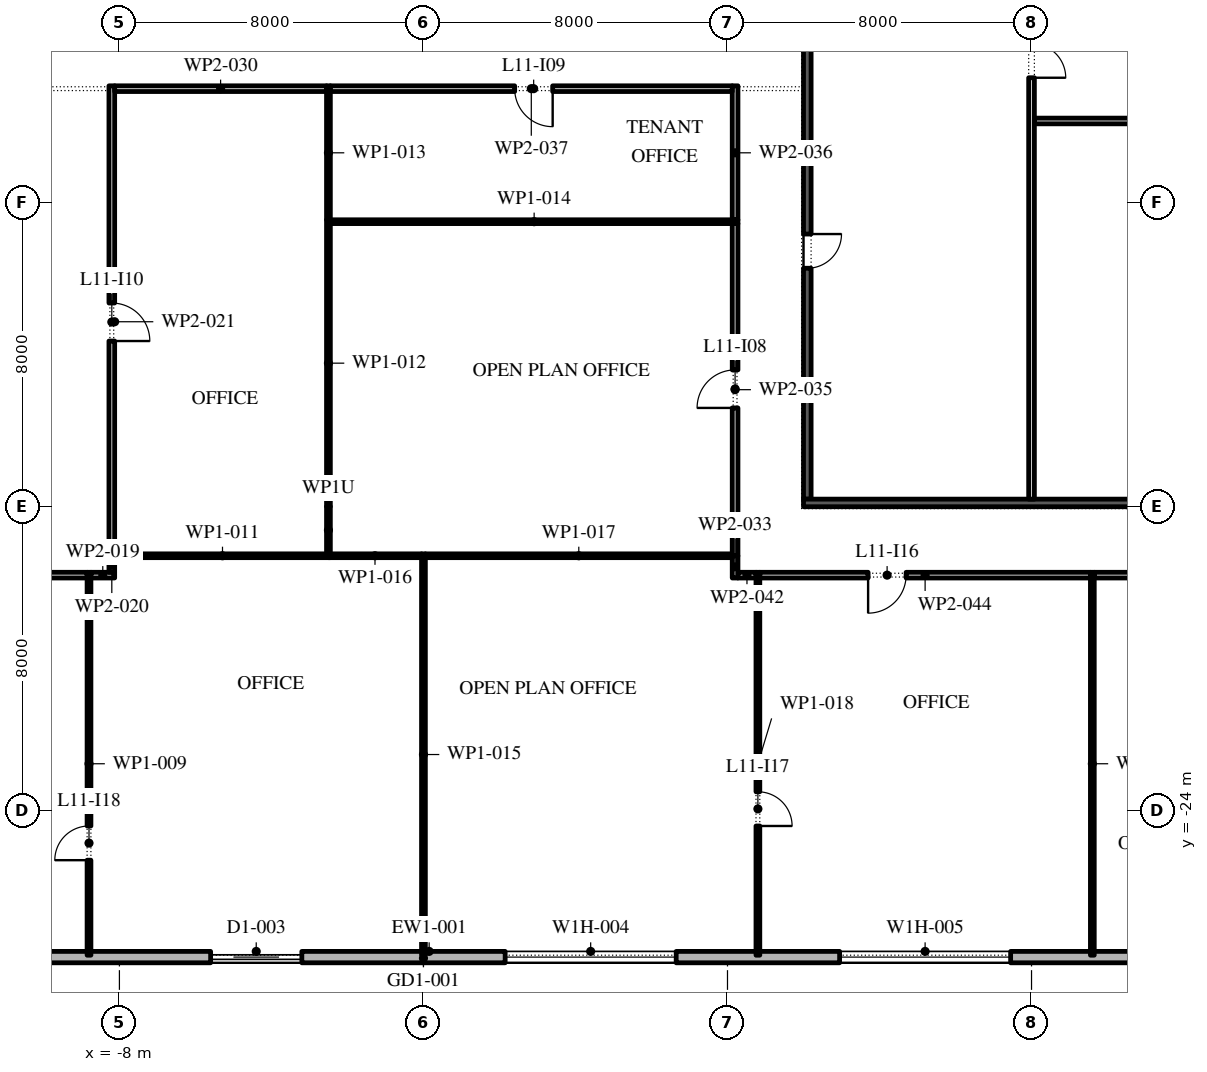
"""IFC4 building model, lengths in metres.
Left out: names, types, materials, properties, quantities, classifications, styles, units other than length and angle.
Written with IfcOpenShell. Run it as: python <this file> out.ifc"""

import sys

from ifc_helpers import new_model, si_unit, direction, frame, frame_2d, origin, place, context, subcontext, project, spatial, rectangle, extrude, element, fill, save


model = new_model("IFC4")
c1 = context("Model", 3, precision=1e-05, world=origin(), true_north=direction((0.0, 1.0)))
c2 = subcontext(c1, "Body", "Model", "MODEL_VIEW")
j1 = project(units=[si_unit("LENGTHUNIT", "METRE"), si_unit("PLANEANGLEUNIT", "RADIAN")], contexts=[c1])
p1 = place(None, origin())
s1 = spatial("IfcSite", under=j1, at=p1, CompositionType="ELEMENT")
p2 = place(p1, origin())
s2 = spatial("IfcBuilding", under=s1, at=p2, CompositionType="ELEMENT")
p3 = place(p2, frame((0.0, 0.0, 56.4)))
s3 = spatial("IfcBuildingStorey", under=s2, at=p3, CompositionType="ELEMENT", Elevation=56.4)
p4 = place(p3, frame((-26.1, -27.85, 0.0), z_axis=(0.0, 0.0, 1.0), x_axis=(1.0, 0.0, 0.0)))
e1 = element("IfcWall", 1, at=p4, inside=s3, PredefinedType="STANDARD", context=c2, shape_type="SweptSolid", body=[
    extrude(rectangle(XDim=52.5, YDim=0.3, at=frame_2d((26.25, 0.0))), origin(), (0.0, 0.0, 1.0), 4.0),
])
p5 = place(p4, frame((2.0, 0.0, 0.45)))
e2 = element("IfcOpeningElement", 2, at=p5, cuts=e1, PredefinedType="OPENING", context=c2, shape_type="SweptSolid", body=[
    extrude(rectangle(XDim=4.5, YDim=2.75, at=frame_2d((2.25, 1.375))), frame((0.0, 0.16, 0.0), z_axis=(0.0, -1.0, 0.0), x_axis=(1.0, 0.0, 0.0)), (0.0, 0.0, 1.0), 0.32),
])
p6 = place(p4, frame((10.65, 0.0, 0.45)))
e3 = element("IfcOpeningElement", 3, at=p6, cuts=e1, PredefinedType="OPENING", context=c2, shape_type="SweptSolid", body=[
    extrude(rectangle(XDim=4.5, YDim=2.75, at=frame_2d((2.25, 1.375))), frame((0.0, 0.16, 0.0), z_axis=(0.0, -1.0, 0.0), x_axis=(1.0, 0.0, 0.0)), (0.0, 0.0, 1.0), 0.32),
])
p7 = place(p4, frame((20.5, 0.0, 0.0)))
e4 = element("IfcOpeningElement", 4, at=p7, cuts=e1, PredefinedType="OPENING", context=c2, shape_type="SweptSolid", body=[
    extrude(rectangle(XDim=2.4, YDim=3.5, at=frame_2d((1.2, 1.75))), frame((0.0, 0.16, 0.0), z_axis=(0.0, -1.0, 0.0), x_axis=(1.0, 0.0, 0.0)), (0.0, 0.0, 1.0), 0.32),
])
p8 = place(p4, frame((28.25, 0.0, 0.45)))
e5 = element("IfcOpeningElement", 5, at=p8, cuts=e1, PredefinedType="OPENING", context=c2, shape_type="SweptSolid", body=[
    extrude(rectangle(XDim=4.5, YDim=2.75, at=frame_2d((2.25, 1.375))), frame((0.0, 0.16, 0.0), z_axis=(0.0, -1.0, 0.0), x_axis=(1.0, 0.0, 0.0)), (0.0, 0.0, 1.0), 0.32),
])
p9 = place(p4, frame((37.05, 0.0, 0.45)))
e6 = element("IfcOpeningElement", 6, at=p9, cuts=e1, PredefinedType="OPENING", context=c2, shape_type="SweptSolid", body=[
    extrude(rectangle(XDim=4.5, YDim=2.75, at=frame_2d((2.25, 1.375))), frame((0.0, 0.16, 0.0), z_axis=(0.0, -1.0, 0.0), x_axis=(1.0, 0.0, 0.0)), (0.0, 0.0, 1.0), 0.32),
])
p10 = place(p4, frame((45.85, 0.0, 0.45)))
e7 = element("IfcOpeningElement", 7, at=p10, cuts=e1, PredefinedType="OPENING", context=c2, shape_type="SweptSolid", body=[
    extrude(rectangle(XDim=4.5, YDim=2.75, at=frame_2d((2.25, 1.375))), frame((0.0, 0.16, 0.0), z_axis=(0.0, -1.0, 0.0), x_axis=(1.0, 0.0, 0.0)), (0.0, 0.0, 1.0), 0.32),
])
p11 = place(p3, frame((10.1, -15.8, 0.0), z_axis=(0.0, 0.0, 1.0), x_axis=(0.0, 1.0, 0.0)))
e8 = element("IfcWall", 8, at=p11, inside=s3, PredefinedType="SHEAR", context=c2, shape_type="SweptSolid", body=[
    extrude(rectangle(XDim=13.05, YDim=0.2, at=frame_2d((6.525, 0.0))), origin(), (0.0, 0.0, 1.0), 4.0),
])
p12 = place(p11, frame((6.075, 0.0, 0.0)))
e9 = element("IfcOpeningElement", 9, at=p12, cuts=e8, PredefinedType="OPENING", context=c2, shape_type="SweptSolid", body=[
    extrude(rectangle(XDim=0.9, YDim=2.1, at=frame_2d((0.45, 1.05))), frame((0.0, 0.11, 0.0), z_axis=(0.0, -1.0, 0.0), x_axis=(1.0, 0.0, 0.0)), (0.0, 0.0, 1.0), 0.22),
])
p13 = place(p3, frame((10.0, -15.9, 0.0), z_axis=(0.0, 0.0, 1.0), x_axis=(1.0, 0.0, 0.0)))
e10 = element("IfcWall", 10, at=p13, inside=s3, PredefinedType="SHEAR", context=c2, shape_type="SweptSolid", body=[
    extrude(rectangle(XDim=12.0, YDim=0.2, at=frame_2d((6.0, 0.0))), origin(), (0.0, 0.0, 1.0), 4.0),
])
p14 = place(p3, frame((16.0, -15.8, 0.0), z_axis=(0.0, 0.0, 1.0), x_axis=(0.0, 1.0, 0.0)))
e11 = element("IfcWall", 11, at=p14, inside=s3, PredefinedType="PARTITIONING", context=c2, shape_type="SweptSolid", body=[
    extrude(rectangle(XDim=13.05, YDim=0.15, at=frame_2d((6.525, 0.0))), origin(), (0.0, 0.0, 1.0), 4.0),
])
p15 = place(p14, frame((11.087, 0.0, 0.0)))
e12 = element("IfcOpeningElement", 12, at=p15, cuts=e11, PredefinedType="OPENING", context=c2, shape_type="SweptSolid", body=[
    extrude(rectangle(XDim=0.9, YDim=2.1, at=frame_2d((0.45, 1.05))), frame((0.0, 0.085, 0.0), z_axis=(0.0, -1.0, 0.0), x_axis=(1.0, 0.0, 0.0)), (0.0, 0.0, 1.0), 0.17),
])
p16 = place(p3, frame((16.075, -5.85, 0.0), z_axis=(0.0, 0.0, 1.0), x_axis=(1.0, 0.0, 0.0)))
e13 = element("IfcWall", 13, at=p16, inside=s3, PredefinedType="PARTITIONING", context=c2, shape_type="SweptSolid", body=[
    extrude(rectangle(XDim=5.725, YDim=0.15, at=frame_2d((2.863, 0.0))), origin(), (0.0, 0.0, 1.0), 4.0),
])
p17 = place(p3, frame((-8.8, -27.8, 0.0), z_axis=(0.0, 0.0, 1.0), x_axis=(0.0, 1.0, 0.0)))
e14 = element("IfcWall", 14, at=p17, inside=s3, PredefinedType="PARTITIONING", context=c2, shape_type="SweptSolid", body=[
    extrude(rectangle(XDim=10.075, YDim=0.1, at=frame_2d((5.038, 0.0))), origin(), (0.0, 0.0, 1.0), 4.0),
])
p18 = place(p17, frame((2.5, 0.0, 0.0)))
e15 = element("IfcOpeningElement", 15, at=p18, cuts=e14, PredefinedType="OPENING", context=c2, shape_type="SweptSolid", body=[
    extrude(rectangle(XDim=0.9, YDim=2.1, at=frame_2d((0.45, 1.05))), frame((0.0, 0.06, 0.0), z_axis=(0.0, -1.0, 0.0), x_axis=(1.0, 0.0, 0.0)), (0.0, 0.0, 1.0), 0.12),
])
p19 = place(p3, frame((-8.85, -17.8, 0.0), z_axis=(0.0, 0.0, 1.0), x_axis=(-1.0, 0.0, 0.0)))
e16 = element("IfcWall", 16, at=p19, inside=s3, PredefinedType="PARTITIONING", context=c2, shape_type="SweptSolid", body=[
    extrude(rectangle(XDim=8.7, YDim=0.15, at=frame_2d((4.35, 0.0))), origin(), (0.0, 0.0, 1.0), 4.0),
])
p20 = place(p19, frame((5.6, 0.0, 0.0)))
e17 = element("IfcOpeningElement", 17, at=p20, cuts=e16, PredefinedType="OPENING", context=c2, shape_type="SweptSolid", body=[
    extrude(rectangle(XDim=1.0, YDim=2.1, at=frame_2d((0.5, 1.05))), frame((0.0, 0.085, 0.0), z_axis=(0.0, -1.0, 0.0), x_axis=(1.0, 0.0, 0.0)), (0.0, 0.0, 1.0), 0.17),
])
p21 = place(p3, frame((-8.125, -17.8, 0.0), z_axis=(0.0, 0.0, 1.0), x_axis=(-1.0, 0.0, 0.0)))
e18 = element("IfcWall", 18, at=p21, inside=s3, PredefinedType="PARTITIONING", context=c2, shape_type="SweptSolid", body=[
    extrude(rectangle(XDim=0.625, YDim=0.15, at=frame_2d((0.312, 0.0))), origin(), (0.0, 0.0, 1.0), 4.0),
])
p22 = place(p3, frame((-8.2, -17.34, 0.0), z_axis=(0.0, 0.0, 1.0), x_axis=(0.0, -1.0, 0.0)))
e19 = element("IfcWall", 19, at=p22, inside=s3, PredefinedType="PARTITIONING", context=c2, shape_type="SweptSolid", body=[
    extrude(rectangle(XDim=0.385, YDim=0.15, at=frame_2d((0.192, 0.0))), origin(), (0.0, 0.0, 1.0), 4.0),
])
p23 = place(p3, frame((-8.2, -4.925, 0.0), z_axis=(0.0, 0.0, 1.0), x_axis=(0.0, -1.0, 0.0)))
e20 = element("IfcWall", 20, at=p23, inside=s3, PredefinedType="PARTITIONING", context=c2, shape_type="SweptSolid", body=[
    extrude(rectangle(XDim=12.415, YDim=0.15, at=frame_2d((6.208, 0.0))), origin(), (0.0, 0.0, 1.0), 4.0),
])
p24 = place(p23, frame((5.715, 0.0, 0.0)))
e21 = element("IfcOpeningElement", 21, at=p24, cuts=e20, PredefinedType="OPENING", context=c2, shape_type="SweptSolid", body=[
    extrude(rectangle(XDim=1.0, YDim=2.1, at=frame_2d((0.5, 1.05))), frame((0.0, 0.085, 0.0), z_axis=(0.0, -1.0, 0.0), x_axis=(1.0, 0.0, 0.0)), (0.0, 0.0, 1.0), 0.17),
])
p25 = place(p3, frame((-2.45, -17.29, 0.0), z_axis=(0.0, 0.0, 1.0), x_axis=(-1.0, 0.0, 0.0)))
e22 = element("IfcWall", 22, at=p25, inside=s3, PredefinedType="PARTITIONING", context=c2, shape_type="SweptSolid", body=[
    extrude(rectangle(XDim=5.675, YDim=0.1, at=frame_2d((2.837, 0.0))), origin(), (0.0, 0.0, 1.0), 4.0),
])
p26 = place(p3, frame((-2.5, -17.24, 0.0), z_axis=(0.0, 0.0, 1.0), x_axis=(0.0, 1.0, 0.0)))
e23 = element("IfcWall", 23, at=p26, inside=s3, PredefinedType="PARTITIONING", context=c2, shape_type="SweptSolid", body=[
    extrude(rectangle(XDim=1.245, YDim=0.1, at=frame_2d((0.623, 0.0))), origin(), (0.0, 0.0, 1.0), 3.322),
])
p27 = place(p3, frame((-2.5, -8.45, 0.0), z_axis=(0.0, 0.0, 1.0), x_axis=(0.0, 1.0, 0.0)))
e24 = element("IfcWall", 24, at=p27, inside=s3, PredefinedType="PARTITIONING", context=c2, shape_type="SweptSolid", body=[
    extrude(rectangle(XDim=3.525, YDim=0.1, at=frame_2d((1.762, 0.0))), origin(), (0.0, 0.0, 1.0), 4.0),
])
p28 = place(p3, frame((-2.45, -8.5, 0.0), z_axis=(0.0, 0.0, 1.0), x_axis=(1.0, 0.0, 0.0)))
e25 = element("IfcWall", 25, at=p28, inside=s3, PredefinedType="PARTITIONING", context=c2, shape_type="SweptSolid", body=[
    extrude(rectangle(XDim=10.725, YDim=0.1, at=frame_2d((5.362, 0.0))), origin(), (0.0, 0.0, 1.0), 4.0),
])
p29 = place(p3, frame((-2.55, -5.0, 0.0), z_axis=(0.0, 0.0, 1.0), x_axis=(-1.0, 0.0, 0.0)))
e26 = element("IfcWall", 26, at=p29, inside=s3, PredefinedType="PARTITIONING", context=c2, shape_type="SweptSolid", body=[
    extrude(rectangle(XDim=5.575, YDim=0.15, at=frame_2d((2.788, 0.0))), origin(), (0.0, 0.0, 1.0), 4.0),
])
p30 = place(p3, frame((0.0, -27.8, 0.0), z_axis=(0.0, 0.0, 1.0), x_axis=(0.0, 1.0, 0.0)))
e27 = element("IfcWall", 27, at=p30, inside=s3, PredefinedType="PARTITIONING", context=c2, shape_type="SweptSolid", body=[
    extrude(rectangle(XDim=10.56, YDim=0.1, at=frame_2d((5.28, 0.0))), origin(), (0.0, 0.0, 1.0), 4.0),
])
p31 = place(p3, frame((-0.05, -17.29, 0.0), z_axis=(0.0, 0.0, 1.0), x_axis=(-1.0, 0.0, 0.0)))
e28 = element("IfcWall", 28, at=p31, inside=s3, PredefinedType="PARTITIONING", context=c2, shape_type="SweptSolid", body=[
    extrude(rectangle(XDim=2.45, YDim=0.1, at=frame_2d((1.225, 0.0))), origin(), (0.0, 0.0, 1.0), 4.0),
])
p32 = place(p3, frame((8.2, -17.875, 0.0), z_axis=(0.0, 0.0, 1.0), x_axis=(0.0, 1.0, 0.0)))
e29 = element("IfcWall", 29, at=p32, inside=s3, PredefinedType="PARTITIONING", context=c2, shape_type="SweptSolid", body=[
    extrude(rectangle(XDim=0.585, YDim=0.15, at=frame_2d((0.292, 0.0))), origin(), (0.0, 0.0, 1.0), 4.0),
])
p33 = place(p3, frame((8.125, -17.29, 0.0), z_axis=(0.0, 0.0, 1.0), x_axis=(-1.0, 0.0, 0.0)))
e30 = element("IfcWall", 30, at=p33, inside=s3, PredefinedType="PARTITIONING", context=c2, shape_type="SweptSolid", body=[
    extrude(rectangle(XDim=8.075, YDim=0.1, at=frame_2d((4.038, 0.0))), origin(), (0.0, 0.0, 1.0), 4.0),
])
p34 = place(p3, frame((8.2, -17.29, 0.0), z_axis=(0.0, 0.0, 1.0), x_axis=(0.0, 1.0, 0.0)))
e31 = element("IfcWall", 31, at=p34, inside=s3, PredefinedType="PARTITIONING", context=c2, shape_type="SweptSolid", body=[
    extrude(rectangle(XDim=8.74, YDim=0.15, at=frame_2d((4.37, 0.0))), origin(), (0.0, 0.0, 1.0), 4.0),
])
p35 = place(p34, frame((3.89, 0.0, 0.0)))
e32 = element("IfcOpeningElement", 32, at=p35, cuts=e31, PredefinedType="OPENING", context=c2, shape_type="SweptSolid", body=[
    extrude(rectangle(XDim=1.0, YDim=2.1, at=frame_2d((0.5, 1.05))), frame((0.0, 0.085, 0.0), z_axis=(0.0, -1.0, 0.0), x_axis=(1.0, 0.0, 0.0)), (0.0, 0.0, 1.0), 0.17),
])
p36 = place(p3, frame((8.2, -8.45, 0.0), z_axis=(0.0, 0.0, 1.0), x_axis=(0.0, 1.0, 0.0)))
e33 = element("IfcWall", 33, at=p36, inside=s3, PredefinedType="PARTITIONING", context=c2, shape_type="SweptSolid", body=[
    extrude(rectangle(XDim=3.525, YDim=0.15, at=frame_2d((1.762, 0.0))), origin(), (0.0, 0.0, 1.0), 4.0),
])
p37 = place(p3, frame((8.125, -5.0, 0.0), z_axis=(0.0, 0.0, 1.0), x_axis=(-1.0, 0.0, 0.0)))
e34 = element("IfcWall", 34, at=p37, inside=s3, PredefinedType="PARTITIONING", context=c2, shape_type="SweptSolid", body=[
    extrude(rectangle(XDim=10.575, YDim=0.15, at=frame_2d((5.288, 0.0))), origin(), (0.0, 0.0, 1.0), 4.0),
])
p38 = place(p37, frame((4.725, 0.0, 0.0)))
e35 = element("IfcOpeningElement", 35, at=p38, cuts=e34, PredefinedType="OPENING", context=c2, shape_type="SweptSolid", body=[
    extrude(rectangle(XDim=1.0, YDim=2.1, at=frame_2d((0.5, 1.05))), frame((0.0, 0.085, 0.0), z_axis=(0.0, -1.0, 0.0), x_axis=(1.0, 0.0, 0.0)), (0.0, 0.0, 1.0), 0.17),
])
p39 = place(p3, frame((8.8, -27.8, 0.0), z_axis=(0.0, 0.0, 1.0), x_axis=(0.0, 1.0, 0.0)))
e36 = element("IfcWall", 36, at=p39, inside=s3, PredefinedType="PARTITIONING", context=c2, shape_type="SweptSolid", body=[
    extrude(rectangle(XDim=10.075, YDim=0.1, at=frame_2d((5.038, 0.0))), origin(), (0.0, 0.0, 1.0), 4.0),
])
p40 = place(p39, frame((3.4, 0.0, 0.0)))
e37 = element("IfcOpeningElement", 37, at=p40, cuts=e36, PredefinedType="OPENING", context=c2, shape_type="SweptSolid", body=[
    extrude(rectangle(XDim=0.9, YDim=2.1, at=frame_2d((0.45, 1.05))), frame((0.0, 0.06, 0.0), z_axis=(0.0, -1.0, 0.0), x_axis=(1.0, 0.0, 0.0)), (0.0, 0.0, 1.0), 0.12),
])
p41 = place(p3, frame((8.75, -17.8, 0.0), z_axis=(0.0, 0.0, 1.0), x_axis=(-1.0, 0.0, 0.0)))
e38 = element("IfcWall", 38, at=p41, inside=s3, PredefinedType="PARTITIONING", context=c2, shape_type="SweptSolid", body=[
    extrude(rectangle(XDim=0.475, YDim=0.15, at=frame_2d((0.238, 0.0))), origin(), (0.0, 0.0, 1.0), 4.0),
])
p42 = place(p3, frame((17.6, -27.8, 0.0), z_axis=(0.0, 0.0, 1.0), x_axis=(0.0, 1.0, 0.0)))
e39 = element("IfcWall", 39, at=p42, inside=s3, PredefinedType="PARTITIONING", context=c2, shape_type="SweptSolid", body=[
    extrude(rectangle(XDim=10.075, YDim=0.1, at=frame_2d((5.038, 0.0))), origin(), (0.0, 0.0, 1.0), 4.0),
])
p43 = place(p3, frame((17.55, -17.8, 0.0), z_axis=(0.0, 0.0, 1.0), x_axis=(-1.0, 0.0, 0.0)))
e40 = element("IfcWall", 40, at=p43, inside=s3, PredefinedType="PARTITIONING", context=c2, shape_type="SweptSolid", body=[
    extrude(rectangle(XDim=8.7, YDim=0.15, at=frame_2d((4.35, 0.0))), origin(), (0.0, 0.0, 1.0), 4.0),
])
p44 = place(p43, frame((4.85, 0.0, 0.0)))
e41 = element("IfcOpeningElement", 41, at=p44, cuts=e40, PredefinedType="OPENING", context=c2, shape_type="SweptSolid", body=[
    extrude(rectangle(XDim=1.0, YDim=2.1, at=frame_2d((0.5, 1.05))), frame((0.0, 0.085, 0.0), z_axis=(0.0, -1.0, 0.0), x_axis=(1.0, 0.0, 0.0)), (0.0, 0.0, 1.0), 0.17),
])
p45 = place(p3, frame((23.875, -17.8, 0.0), z_axis=(0.0, 0.0, 1.0), x_axis=(-1.0, 0.0, 0.0)))
e42 = element("IfcWall", 42, at=p45, inside=s3, PredefinedType="PARTITIONING", context=c2, shape_type="SweptSolid", body=[
    extrude(rectangle(XDim=6.225, YDim=0.15, at=frame_2d((3.113, 0.0))), origin(), (0.0, 0.0, 1.0), 4.0),
])
p46 = place(p45, frame((2.125, 0.0, 0.0)))
e43 = element("IfcOpeningElement", 43, at=p46, cuts=e42, PredefinedType="OPENING", context=c2, shape_type="SweptSolid", body=[
    extrude(rectangle(XDim=1.0, YDim=2.1, at=frame_2d((0.5, 1.05))), frame((0.0, 0.085, 0.0), z_axis=(0.0, -1.0, 0.0), x_axis=(1.0, 0.0, 0.0)), (0.0, 0.0, 1.0), 0.17),
])
p47 = place(p3, frame((-2.5, -15.995, 0.0), z_axis=(0.0, 0.0, 1.0), x_axis=(0.0, 1.0, 0.0)))
e44 = element("IfcWall", 44, at=p47, inside=s3, PredefinedType="PARTITIONING", context=c2, shape_type="SweptSolid", body=[
    extrude(rectangle(XDim=7.545, YDim=0.1, at=frame_2d((3.772, 0.0))), origin(), (0.0, 0.0, 1.0), 4.0),
])
p48 = place(p7, origin())
e45 = element("IfcDoor", 45, at=p48, inside=s3, OperationType="DOUBLE_DOOR_SLIDING", PredefinedType="DOOR", context=c2, shape_type="SweptSolid", body=[
    extrude(rectangle(XDim=2.4, YDim=3.5, at=frame_2d((1.2, 1.75))), frame((0.0, 0.025, 0.0), z_axis=(0.0, -1.0, 0.0), x_axis=(1.0, 0.0, 0.0)), (0.0, 0.0, 1.0), 0.05),
])
fill(e4, e45)
p49 = place(p8, origin())
e46 = element("IfcWindow", 46, at=p49, inside=s3, PartitioningType="DOUBLE_PANEL_VERTICAL", PredefinedType="WINDOW", context=c2, shape_type="SweptSolid", body=[
    extrude(rectangle(XDim=4.5, YDim=2.75, at=frame_2d((2.25, 1.375))), frame((0.0, 0.03, 0.0), z_axis=(0.0, -1.0, 0.0), x_axis=(1.0, 0.0, 0.0)), (0.0, 0.0, 1.0), 0.06),
])
fill(e5, e46)
p50 = place(p9, origin())
e47 = element("IfcWindow", 47, at=p50, inside=s3, PartitioningType="DOUBLE_PANEL_VERTICAL", PredefinedType="WINDOW", context=c2, shape_type="SweptSolid", body=[
    extrude(rectangle(XDim=4.5, YDim=2.75, at=frame_2d((2.25, 1.375))), frame((0.0, 0.03, 0.0), z_axis=(0.0, -1.0, 0.0), x_axis=(1.0, 0.0, 0.0)), (0.0, 0.0, 1.0), 0.06),
])
fill(e6, e47)
p51 = place(p15, frame((0.9, 0.0, 0.0), z_axis=(0.0, 0.0, 1.0), x_axis=(-1.0, 0.0, 0.0)))
e48 = element("IfcDoor", 48, at=p51, inside=s3, OperationType="SINGLE_SWING_LEFT", PredefinedType="DOOR", context=c2, shape_type="SweptSolid", body=[
    extrude(rectangle(XDim=0.9, YDim=2.1, at=frame_2d((0.45, 1.05))), frame((0.0, 0.025, 0.0), z_axis=(0.0, -1.0, 0.0), x_axis=(1.0, 0.0, 0.0)), (0.0, 0.0, 1.0), 0.05),
])
fill(e12, e48)
p52 = place(p12, frame((0.9, -0.15, 0.0), z_axis=(0.0, 0.0, 1.0), x_axis=(-1.0, 0.0, 0.0)))
e49 = element("IfcDoor", 49, at=p52, inside=s3, OperationType="SINGLE_SWING_RIGHT", PredefinedType="DOOR", context=c2, shape_type="SweptSolid", body=[
    extrude(rectangle(XDim=0.9, YDim=2.1, at=frame_2d((0.45, 1.05))), frame((0.0, -0.05, 0.0), z_axis=(0.0, -1.0, 0.0), x_axis=(1.0, 0.0, 0.0)), (0.0, 0.0, 1.0), 0.05),
])
fill(e9, e49)
p53 = place(p35, origin())
e50 = element("IfcDoor", 50, at=p53, inside=s3, OperationType="SINGLE_SWING_RIGHT", PredefinedType="DOOR", context=c2, shape_type="SweptSolid", body=[
    extrude(rectangle(XDim=1.0, YDim=2.1, at=frame_2d((0.5, 1.05))), frame((0.0, 0.025, 0.0), z_axis=(0.0, -1.0, 0.0), x_axis=(1.0, 0.0, 0.0)), (0.0, 0.0, 1.0), 0.05),
])
fill(e32, e50)
p54 = place(p38, origin())
e51 = element("IfcDoor", 51, at=p54, inside=s3, OperationType="SINGLE_SWING_RIGHT", PredefinedType="DOOR", context=c2, shape_type="SweptSolid", body=[
    extrude(rectangle(XDim=1.0, YDim=2.1, at=frame_2d((0.5, 1.05))), frame((0.0, 0.025, 0.0), z_axis=(0.0, -1.0, 0.0), x_axis=(1.0, 0.0, 0.0)), (0.0, 0.0, 1.0), 0.05),
])
fill(e35, e51)
p55 = place(p24, origin())
e52 = element("IfcDoor", 52, at=p55, inside=s3, OperationType="SINGLE_SWING_LEFT", PredefinedType="DOOR", context=c2, shape_type="SweptSolid", body=[
    extrude(rectangle(XDim=1.0, YDim=2.1, at=frame_2d((0.5, 1.05))), frame((0.0, 0.025, 0.0), z_axis=(0.0, -1.0, 0.0), x_axis=(1.0, 0.0, 0.0)), (0.0, 0.0, 1.0), 0.05),
])
fill(e21, e52)
p56 = place(p44, origin())
e53 = element("IfcDoor", 53, at=p56, inside=s3, OperationType="SINGLE_SWING_LEFT", PredefinedType="DOOR", context=c2, shape_type="SweptSolid", body=[
    extrude(rectangle(XDim=1.0, YDim=2.1, at=frame_2d((0.5, 1.05))), frame((0.0, 0.025, 0.0), z_axis=(0.0, -1.0, 0.0), x_axis=(1.0, 0.0, 0.0)), (0.0, 0.0, 1.0), 0.05),
])
fill(e41, e53)
p57 = place(p40, frame((0.9, 0.0, 0.0), z_axis=(0.0, 0.0, 1.0), x_axis=(-1.0, 0.0, 0.0)))
e54 = element("IfcDoor", 54, at=p57, inside=s3, OperationType="SINGLE_SWING_LEFT", PredefinedType="DOOR", context=c2, shape_type="SweptSolid", body=[
    extrude(rectangle(XDim=0.9, YDim=2.1, at=frame_2d((0.45, 1.05))), frame((0.0, 0.025, 0.0), z_axis=(0.0, -1.0, 0.0), x_axis=(1.0, 0.0, 0.0)), (0.0, 0.0, 1.0), 0.05),
])
fill(e37, e54)
p58 = place(p18, origin())
e55 = element("IfcDoor", 55, at=p58, inside=s3, OperationType="SINGLE_SWING_RIGHT", PredefinedType="DOOR", context=c2, shape_type="SweptSolid", body=[
    extrude(rectangle(XDim=0.9, YDim=2.1, at=frame_2d((0.45, 1.05))), frame((0.0, 0.025, 0.0), z_axis=(0.0, -1.0, 0.0), x_axis=(1.0, 0.0, 0.0)), (0.0, 0.0, 1.0), 0.05),
])
fill(e15, e55)
save(model, sys.argv[1])
